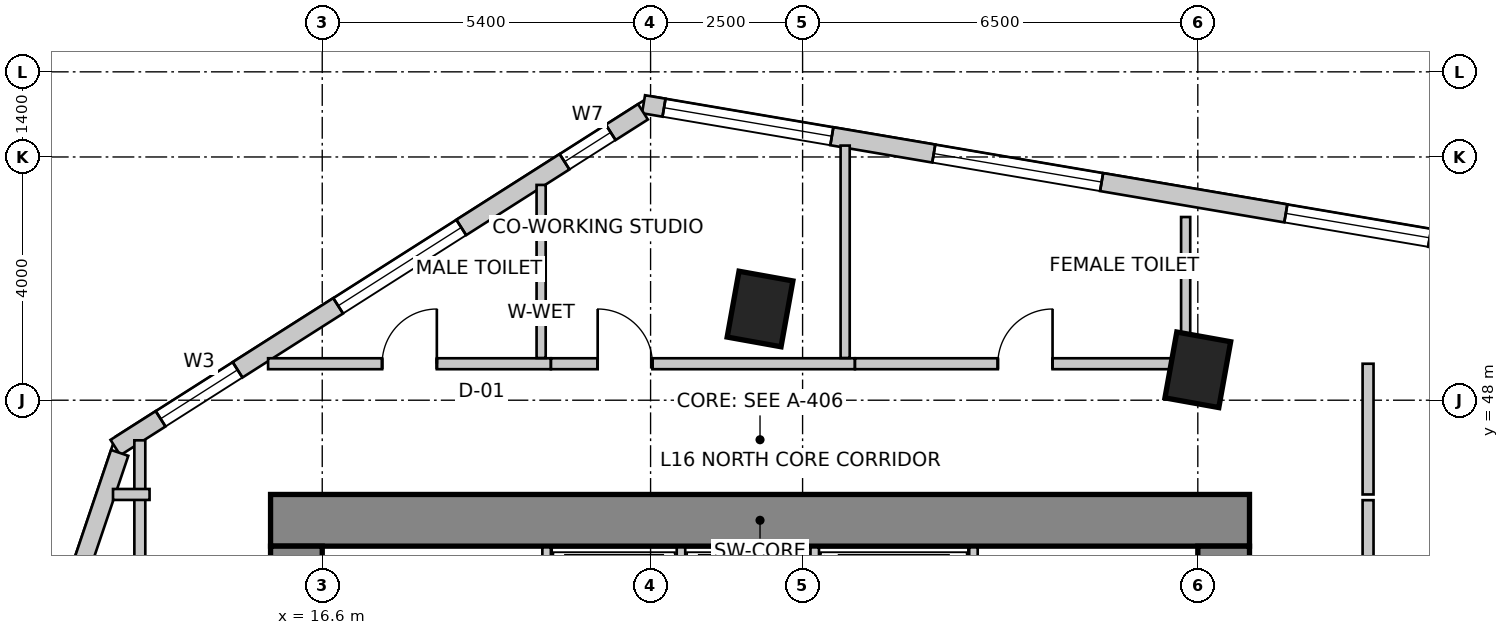
"""IFC4 building model, lengths in metres.
Left out: names, types, materials, properties, quantities, classifications, styles, units other than length and angle.
Written with IfcOpenShell. Run it as: python <this file> out.ifc"""

import sys

from ifc_helpers import new_model, si_unit, direction, frame, frame_2d, origin, origin_2d, place, context, subcontext, project, spatial, rectangle, extrude, source, transform, mapped, element, fill, save


model = new_model("IFC4")
c1 = context("Model", 3, precision=1e-05, world=origin(), true_north=direction((0.0, 1.0)))
c2 = subcontext(c1, "Body", "Model", "MODEL_VIEW")
j1 = project(units=[si_unit("LENGTHUNIT", "METRE"), si_unit("PLANEANGLEUNIT", "RADIAN")], contexts=[c1])
p1 = place(None, origin())
s1 = spatial("IfcSite", under=j1, at=p1, CompositionType="ELEMENT")
p2 = place(p1, origin())
s2 = spatial("IfcBuilding", under=s1, at=p2, CompositionType="ELEMENT")
p3 = place(p2, frame((0.0, 0.0, 67.0)))
s3 = spatial("IfcBuildingStorey", under=s2, at=p3, CompositionType="ELEMENT", Elevation=67.0)
p4 = place(p3, frame((15.75, 46.025, 0.0), z_axis=(0.0, 0.0, 1.0), x_axis=(1.0, 0.0, 0.0)))
e1 = element("IfcWall", 1, at=p4, inside=s3, PredefinedType="SHEAR", context=c2, shape_type="SweptSolid", body=[
    extrude(rectangle(XDim=16.1, YDim=0.85, at=frame_2d((8.05, 0.0))), origin(), (0.0, 0.0, 1.0), 4.0),
])
p5 = place(p3, frame((16.175, 34.2, 0.0), z_axis=(0.0, 0.0, 1.0), x_axis=(0.0, 1.0, 0.0)))
e2 = element("IfcWall", 2, at=p5, inside=s3, PredefinedType="SHEAR", context=c2, shape_type="SweptSolid", body=[
    extrude(rectangle(XDim=11.4, YDim=0.85, at=frame_2d((5.7, 0.0))), origin(), (0.0, 0.0, 1.0), 4.0),
])
m1 = source(origin(), c2, "Body", "SweptSolid", [
    extrude(rectangle(XDim=1.1, YDim=2.15, at=frame_2d((0.55, 1.075))), frame((0.0, 0.435, 0.0), z_axis=(0.0, -1.0, 0.0), x_axis=(1.0, 0.0, 0.0)), (0.0, 0.0, 1.0), 0.87),
])
p6 = place(p5, frame((7.15, 0.0, 0.0)))
e3 = element("IfcOpeningElement", 3, at=p6, cuts=e2, PredefinedType="OPENING", context=c2, shape_type="MappedRepresentation", body=[
    mapped(m1, transform((0.0, 0.0, 0.0), scale=1.0)),
])
p7 = place(p3, frame((31.425, 34.2, 0.0), z_axis=(0.0, 0.0, 1.0), x_axis=(0.0, 1.0, 0.0)))
e4 = element("IfcWall", 4, at=p7, inside=s3, PredefinedType="SHEAR", context=c2, shape_type="SweptSolid", body=[
    extrude(rectangle(XDim=11.4, YDim=0.85, at=frame_2d((5.7, 0.0))), origin(), (0.0, 0.0, 1.0), 4.0),
])
p8 = place(p7, frame((7.35, 0.0, 0.0)))
e5 = element("IfcOpeningElement", 5, at=p8, cuts=e4, PredefinedType="OPENING", context=c2, shape_type="MappedRepresentation", body=[
    mapped(m1, transform((0.0, 0.0, 0.0), scale=1.0)),
])
m2 = source(origin(), c2, "Body", "SweptSolid", [
    extrude(rectangle(XDim=0.9, YDim=1.1, at=origin_2d()), origin(), (0.0, 0.0, 1.0), 4.0),
])
for number, where, z_axis, x_axis in (
    (6, (23.8, 49.5, 0.0), (0.0, 0.0, 1.0), (0.984, -0.177, 0.0)),
    (7, (31.0, 48.5, 0.0), (0.0, 0.0, 1.0), (0.984, -0.177, 0.0)),
):
    element("IfcColumn", number, at=place(p3, frame(where, z_axis=z_axis, x_axis=x_axis)), inside=s3, PredefinedType="COLUMN", context=c2, shape_type="MappedRepresentation", body=[
        mapped(m2, transform((0.0, 0.0, 0.0), scale=1.0)),
    ])
p9 = place(p3, frame((53.961, 47.417, 0.0), z_axis=(0.0, 0.0, 1.0), x_axis=(-0.985865713455, 0.167537443678, 0.0)))
e8 = element("IfcWall", 8, at=p9, inside=s3, PredefinedType="SOLIDWALL", context=c2, shape_type="SweptSolid", body=[
    extrude(rectangle(XDim=32.537, YDim=0.3, at=frame_2d((16.269, 0.0))), origin(), (0.0, 0.0, 1.0), 3.75),
])
m3 = source(origin(), c2, "Body", "SweptSolid", [
    extrude(rectangle(XDim=2.4, YDim=2.2, at=frame_2d((1.2, 1.1))), frame((0.0, 0.16, 0.0), z_axis=(0.0, -1.0, 0.0), x_axis=(1.0, 0.0, 0.0)), (0.0, 0.0, 1.0), 0.32),
])
p10 = place(p9, frame((0.476, 0.0, 0.85)))
e9 = element("IfcOpeningElement", 9, at=p10, cuts=e8, PredefinedType="OPENING", context=c2, shape_type="MappedRepresentation", body=[
    mapped(m3, transform((0.0, 0.0, 0.0), scale=1.0)),
])
m4 = source(origin(), c2, "Body", "SweptSolid", [
    extrude(rectangle(XDim=2.8, YDim=2.4, at=frame_2d((1.4, 1.2))), frame((0.0, 0.16, 0.0), z_axis=(0.0, -1.0, 0.0), x_axis=(1.0, 0.0, 0.0)), (0.0, 0.0, 1.0), 0.32),
])
p11 = place(p9, frame((4.304, 0.0, 0.85)))
e10 = element("IfcOpeningElement", 10, at=p11, cuts=e8, PredefinedType="OPENING", context=c2, shape_type="MappedRepresentation", body=[
    mapped(m4, transform((0.0, 0.0, 0.0), scale=1.0)),
])
p12 = place(p9, frame((8.968, 0.0, 0.85)))
e11 = element("IfcOpeningElement", 11, at=p12, cuts=e8, PredefinedType="OPENING", context=c2, shape_type="MappedRepresentation", body=[
    mapped(m3, transform((0.0, 0.0, 0.0), scale=1.0)),
])
p13 = place(p9, frame((14.034, 0.0, 0.85)))
e12 = element("IfcOpeningElement", 12, at=p13, cuts=e8, PredefinedType="OPENING", context=c2, shape_type="MappedRepresentation", body=[
    mapped(m4, transform((0.0, 0.0, 0.0), scale=1.0)),
])
p14 = place(p9, frame((19.422, 0.0, 0.85)))
e13 = element("IfcOpeningElement", 13, at=p14, cuts=e8, PredefinedType="OPENING", context=c2, shape_type="MappedRepresentation", body=[
    mapped(m3, transform((0.0, 0.0, 0.0), scale=1.0)),
])
p15 = place(p9, frame((24.895, 0.0, 0.85)))
e14 = element("IfcOpeningElement", 14, at=p15, cuts=e8, PredefinedType="OPENING", context=c2, shape_type="MappedRepresentation", body=[
    mapped(m4, transform((0.0, 0.0, 0.0), scale=1.0)),
])
p16 = place(p9, frame((29.395, 0.0, 0.85)))
e15 = element("IfcOpeningElement", 15, at=p16, cuts=e8, PredefinedType="OPENING", context=c2, shape_type="MappedRepresentation", body=[
    mapped(m4, transform((0.0, 0.0, 0.0), scale=1.0)),
])
p17 = place(p3, frame((21.875, 52.742, 0.0), z_axis=(0.0, 0.0, 1.0), x_axis=(-0.843662465249, -0.536873956092, 0.0)))
e16 = element("IfcWall", 16, at=p17, inside=s3, PredefinedType="SOLIDWALL", context=c2, shape_type="SweptSolid", body=[
    extrude(rectangle(XDim=10.284, YDim=0.3, at=frame_2d((5.142, 0.0))), origin(), (0.0, 0.0, 1.0), 3.75),
])
m5 = source(origin(), c2, "Body", "SweptSolid", [
    extrude(rectangle(XDim=0.9, YDim=1.6, at=frame_2d((0.45, 0.8))), frame((0.0, 0.16, 0.0), z_axis=(0.0, -1.0, 0.0), x_axis=(1.0, 0.0, 0.0)), (0.0, 0.0, 1.0), 0.32),
])
p18 = place(p17, frame((0.629, 0.0, 0.85)))
e17 = element("IfcOpeningElement", 17, at=p18, cuts=e16, PredefinedType="OPENING", context=c2, shape_type="MappedRepresentation", body=[
    mapped(m5, transform((0.0, 0.0, 0.0), scale=1.0)),
])
p19 = place(p17, frame((3.542, 0.0, 0.85)))
e18 = element("IfcOpeningElement", 18, at=p19, cuts=e16, PredefinedType="OPENING", context=c2, shape_type="MappedRepresentation", body=[
    mapped(m3, transform((0.0, 0.0, 0.0), scale=1.0)),
])
m6 = source(origin(), c2, "Body", "SweptSolid", [
    extrude(rectangle(XDim=1.5, YDim=1.8, at=frame_2d((0.75, 0.9))), frame((0.0, 0.16, 0.0), z_axis=(0.0, -1.0, 0.0), x_axis=(1.0, 0.0, 0.0)), (0.0, 0.0, 1.0), 0.32),
])
p20 = place(p17, frame((7.903, 0.0, 0.85)))
e19 = element("IfcOpeningElement", 19, at=p20, cuts=e16, PredefinedType="OPENING", context=c2, shape_type="MappedRepresentation", body=[
    mapped(m6, transform((0.0, 0.0, 0.0), scale=1.0)),
])
p21 = place(p3, frame((13.269, 47.134, 0.0), z_axis=(0.0, 0.0, 1.0), x_axis=(-0.319920423265, -0.947444416722, 0.0)))
e20 = element("IfcWall", 20, at=p21, inside=s3, PredefinedType="SOLIDWALL", context=c2, shape_type="SweptSolid", body=[
    extrude(rectangle(XDim=16.135, YDim=0.3, at=frame_2d((8.067, 0.0))), origin(), (0.0, 0.0, 1.0), 3.75),
])
p22 = place(p21, frame((1.988, 0.0, 0.85)))
e21 = element("IfcOpeningElement", 21, at=p22, cuts=e20, PredefinedType="OPENING", context=c2, shape_type="MappedRepresentation", body=[
    mapped(m4, transform((0.0, 0.0, 0.0), scale=1.0)),
])
p23 = place(p21, frame((7.159, 0.0, 0.85)))
e22 = element("IfcOpeningElement", 22, at=p23, cuts=e20, PredefinedType="OPENING", context=c2, shape_type="MappedRepresentation", body=[
    mapped(m3, transform((0.0, 0.0, 0.0), scale=1.0)),
])
p24 = place(p21, frame((11.93, 0.0, 0.85)))
e23 = element("IfcOpeningElement", 23, at=p24, cuts=e20, PredefinedType="OPENING", context=c2, shape_type="MappedRepresentation", body=[
    mapped(m4, transform((0.0, 0.0, 0.0), scale=1.0)),
])
for number, where, z_axis, x_axis in (
    (24, (20.29, 43.28, 0.0), (0.0, 0.0, 1.0), (0.0, 1.0, 0.0)),
    (25, (27.31, 43.28, 0.0), (0.0, 0.0, 1.0), (0.0, 1.0, 0.0)),
):
    element("IfcWall", number, at=place(p3, frame(where, z_axis=z_axis, x_axis=x_axis)), inside=s3, PredefinedType="SOLIDWALL", context=c2, shape_type="SweptSolid", body=[
        extrude(rectangle(XDim=2.3, YDim=0.14, at=frame_2d((1.15, 0.0))), origin(), (0.0, 0.0, 1.0), 3.75),
    ])
for number, where, z_axis, x_axis in (
    (26, (22.5, 43.02, 0.0), (0.0, 0.0, 1.0), (0.0, 1.0, 0.0)),
    (27, (24.7, 43.02, 0.0), (0.0, 0.0, 1.0), (0.0, 1.0, 0.0)),
):
    element("IfcWall", number, at=place(p3, frame(where, z_axis=z_axis, x_axis=x_axis)), inside=s3, PredefinedType="SOLIDWALL", context=c2, shape_type="SweptSolid", body=[
        extrude(rectangle(XDim=2.56, YDim=0.14, at=frame_2d((1.28, 0.0))), origin(), (0.0, 0.0, 1.0), 3.75),
    ])
p25 = place(p3, frame((13.6, 33.444, 0.0), z_axis=(0.0, 0.0, 1.0), x_axis=(0.0, 1.0, 0.0)))
e28 = element("IfcWall", 28, at=p25, inside=s3, PredefinedType="PARTITIONING", context=c2, shape_type="SweptSolid", body=[
    extrude(rectangle(XDim=13.896, YDim=0.18, at=frame_2d((6.948, 0.0))), origin(), (0.0, 0.0, 1.0), 2.892),
])
m7 = source(origin(), c2, "Body", "SweptSolid", [
    extrude(rectangle(XDim=0.9, YDim=2.15, at=frame_2d((0.45, 1.075))), frame((0.0, 0.1, 0.0), z_axis=(0.0, -1.0, 0.0), x_axis=(1.0, 0.0, 0.0)), (0.0, 0.0, 1.0), 0.2),
])
p26 = place(p25, frame((4.144, 0.0, 0.0)))
e29 = element("IfcOpeningElement", 29, at=p26, cuts=e28, PredefinedType="OPENING", context=c2, shape_type="MappedRepresentation", body=[
    mapped(m7, transform((0.0, 0.0, 0.0), scale=1.0)),
])
p27 = place(p3, frame((13.76, 46.45, 0.0), z_axis=(0.0, 0.0, 1.0), x_axis=(-1.0, 0.0, 0.0)))
e30 = element("IfcWall", 30, at=p27, inside=s3, PredefinedType="PARTITIONING", context=c2, shape_type="SweptSolid", body=[
    extrude(rectangle(XDim=0.601, YDim=0.18, at=frame_2d((0.301, 0.0))), origin(), (0.0, 0.0, 1.0), 3.75),
])
p28 = place(p3, frame((15.71, 48.6, 0.0), z_axis=(0.0, 0.0, 1.0), x_axis=(1.0, 0.0, 0.0)))
e31 = element("IfcWall", 31, at=p28, inside=s3, PredefinedType="PARTITIONING", context=c2, shape_type="SweptSolid", body=[
    extrude(rectangle(XDim=4.65, YDim=0.18, at=frame_2d((2.325, 0.0))), origin(), (0.0, 0.0, 1.0), 3.75),
])
p29 = place(p28, frame((1.875, 0.0, 0.0)))
e32 = element("IfcOpeningElement", 32, at=p29, cuts=e31, PredefinedType="OPENING", context=c2, shape_type="MappedRepresentation", body=[
    mapped(m7, transform((0.0, 0.0, 0.0), scale=1.0)),
])
p30 = place(p3, frame((20.362, 48.6, 0.0), z_axis=(0.0, 0.0, 1.0), x_axis=(1.0, 0.0, 0.0)))
e33 = element("IfcWall", 33, at=p30, inside=s3, PredefinedType="PARTITIONING", context=c2, shape_type="SweptSolid", body=[
    extrude(rectangle(XDim=4.998, YDim=0.18, at=frame_2d((2.499, 0.0))), origin(), (0.0, 0.0, 1.0), 3.419),
])
p31 = place(p30, frame((0.768, 0.0, 0.0)))
e34 = element("IfcOpeningElement", 34, at=p31, cuts=e33, PredefinedType="OPENING", context=c2, shape_type="MappedRepresentation", body=[
    mapped(m7, transform((0.0, 0.0, 0.0), scale=1.0)),
])
p32 = place(p3, frame((25.362, 48.6, 0.0), z_axis=(0.0, 0.0, 1.0), x_axis=(1.0, 0.0, 0.0)))
e35 = element("IfcWall", 35, at=p32, inside=s3, PredefinedType="PARTITIONING", context=c2, shape_type="SweptSolid", body=[
    extrude(rectangle(XDim=5.598, YDim=0.18, at=frame_2d((2.799, 0.0))), origin(), (0.0, 0.0, 1.0), 2.892),
])
p33 = place(p32, frame((2.349, 0.0, 0.0)))
e36 = element("IfcOpeningElement", 36, at=p33, cuts=e35, PredefinedType="OPENING", context=c2, shape_type="MappedRepresentation", body=[
    mapped(m7, transform((0.0, 0.0, 0.0), scale=1.0)),
])
p34 = place(p3, frame((33.8, 48.6, 0.0), z_axis=(0.0, 0.0, 1.0), x_axis=(0.0, -1.0, 0.0)))
e37 = element("IfcWall", 37, at=p34, inside=s3, PredefinedType="PARTITIONING", context=c2, shape_type="SweptSolid", body=[
    extrude(rectangle(XDim=2.15, YDim=0.18, at=frame_2d((1.075, 0.0))), origin(), (0.0, 0.0, 1.0), 2.892),
])
p35 = place(p3, frame((33.8, 46.356, 0.0), z_axis=(0.0, 0.0, 1.0), x_axis=(0.0, -1.0, 0.0)))
e38 = element("IfcWall", 38, at=p35, inside=s3, PredefinedType="PARTITIONING", context=c2, shape_type="SweptSolid", body=[
    extrude(rectangle(XDim=3.716, YDim=0.18, at=frame_2d((1.858, 0.0))), origin(), (0.0, 0.0, 1.0), 3.279),
])
p36 = place(p3, frame((20.2, 51.54, 0.0), z_axis=(0.0, 0.0, 1.0), x_axis=(0.0, -1.0, 0.0)))
e39 = element("IfcWall", 39, at=p36, inside=s3, PredefinedType="PARTITIONING", context=c2, shape_type="SweptSolid", body=[
    extrude(rectangle(XDim=2.846, YDim=0.15, at=frame_2d((1.423, 0.0))), origin(), (0.0, 0.0, 1.0), 3.75),
])
p37 = place(p3, frame((25.2, 52.188, 0.0), z_axis=(0.0, 0.0, 1.0), x_axis=(0.0, -1.0, 0.0)))
e40 = element("IfcWall", 40, at=p37, inside=s3, PredefinedType="PARTITIONING", context=c2, shape_type="SweptSolid", body=[
    extrude(rectangle(XDim=3.493, YDim=0.15, at=frame_2d((1.747, 0.0))), origin(), (0.0, 0.0, 1.0), 2.892),
])
p38 = place(p3, frame((30.8, 51.013, 0.0), z_axis=(0.0, 0.0, 1.0), x_axis=(0.0, -1.0, 0.0)))
e41 = element("IfcWall", 41, at=p38, inside=s3, PredefinedType="PARTITIONING", context=c2, shape_type="SweptSolid", body=[
    extrude(rectangle(XDim=2.193, YDim=0.15, at=frame_2d((1.096, 0.0))), origin(), (0.0, 0.0, 1.0), 3.75),
])
m8 = source(origin(), c2, "Body", "SweptSolid", [
    extrude(rectangle(XDim=2.4, YDim=2.2, at=frame_2d((1.2, 1.1))), frame((0.0, -0.015, 0.0), z_axis=(0.0, -1.0, 0.0), x_axis=(1.0, 0.0, 0.0)), (0.0, 0.0, 1.0), 0.06),
])
p39 = place(p14, origin())
e42 = element("IfcWindow", 42, at=p39, inside=s3, PartitioningType="SINGLE_PANEL", PredefinedType="WINDOW", context=c2, shape_type="MappedRepresentation", body=[
    mapped(m8, transform((0.0, 0.0, 0.0), scale=1.0)),
])
fill(e13, e42)
m9 = source(origin(), c2, "Body", "SweptSolid", [
    extrude(rectangle(XDim=2.8, YDim=2.4, at=frame_2d((1.4, 1.2))), frame((0.0, -0.015, 0.0), z_axis=(0.0, -1.0, 0.0), x_axis=(1.0, 0.0, 0.0)), (0.0, 0.0, 1.0), 0.06),
])
p40 = place(p15, origin())
e43 = element("IfcWindow", 43, at=p40, inside=s3, PartitioningType="SINGLE_PANEL", PredefinedType="WINDOW", context=c2, shape_type="MappedRepresentation", body=[
    mapped(m9, transform((0.0, 0.0, 0.0), scale=1.0)),
])
fill(e14, e43)
p41 = place(p16, origin())
e44 = element("IfcWindow", 44, at=p41, inside=s3, PartitioningType="SINGLE_PANEL", PredefinedType="WINDOW", context=c2, shape_type="MappedRepresentation", body=[
    mapped(m9, transform((0.0, 0.0, 0.0), scale=1.0)),
])
fill(e15, e44)
m10 = source(origin(), c2, "Body", "SweptSolid", [
    extrude(rectangle(XDim=0.9, YDim=1.6, at=frame_2d((0.45, 0.8))), frame((0.0, -0.015, 0.0), z_axis=(0.0, -1.0, 0.0), x_axis=(1.0, 0.0, 0.0)), (0.0, 0.0, 1.0), 0.06),
])
p42 = place(p18, origin())
e45 = element("IfcWindow", 45, at=p42, inside=s3, PartitioningType="SINGLE_PANEL", PredefinedType="WINDOW", context=c2, shape_type="MappedRepresentation", body=[
    mapped(m10, transform((0.0, 0.0, 0.0), scale=1.0)),
])
fill(e17, e45)
p43 = place(p19, origin())
e46 = element("IfcWindow", 46, at=p43, inside=s3, PartitioningType="SINGLE_PANEL", PredefinedType="WINDOW", context=c2, shape_type="MappedRepresentation", body=[
    mapped(m8, transform((0.0, 0.0, 0.0), scale=1.0)),
])
fill(e18, e46)
m11 = source(origin(), c2, "Body", "SweptSolid", [
    extrude(rectangle(XDim=1.5, YDim=1.8, at=frame_2d((0.75, 0.9))), frame((0.0, -0.015, 0.0), z_axis=(0.0, -1.0, 0.0), x_axis=(1.0, 0.0, 0.0)), (0.0, 0.0, 1.0), 0.06),
])
p44 = place(p20, origin())
e47 = element("IfcWindow", 47, at=p44, inside=s3, PartitioningType="SINGLE_PANEL", PredefinedType="WINDOW", context=c2, shape_type="MappedRepresentation", body=[
    mapped(m11, transform((0.0, 0.0, 0.0), scale=1.0)),
])
fill(e19, e47)
m12 = source(origin(), c2, "Body", "SweptSolid", [
    extrude(rectangle(XDim=0.9, YDim=2.15, at=frame_2d((0.45, 1.075))), frame((0.0, 0.025, 0.0), z_axis=(0.0, -1.0, 0.0), x_axis=(1.0, 0.0, 0.0)), (0.0, 0.0, 1.0), 0.05),
])
p45 = place(p29, origin())
e48 = element("IfcDoor", 48, at=p45, inside=s3, OperationType="SINGLE_SWING_RIGHT", PredefinedType="DOOR", context=c2, shape_type="MappedRepresentation", body=[
    mapped(m12, transform((0.0, 0.0, 0.0), scale=1.0)),
])
fill(e32, e48)
p46 = place(p31, origin())
e49 = element("IfcDoor", 49, at=p46, inside=s3, OperationType="SINGLE_SWING_LEFT", PredefinedType="DOOR", context=c2, shape_type="MappedRepresentation", body=[
    mapped(m12, transform((0.0, 0.0, 0.0), scale=1.0)),
])
fill(e34, e49)
p47 = place(p33, origin())
e50 = element("IfcDoor", 50, at=p47, inside=s3, OperationType="SINGLE_SWING_RIGHT", PredefinedType="DOOR", context=c2, shape_type="MappedRepresentation", body=[
    mapped(m12, transform((0.0, 0.0, 0.0), scale=1.0)),
])
fill(e36, e50)
save(model, sys.argv[1])
